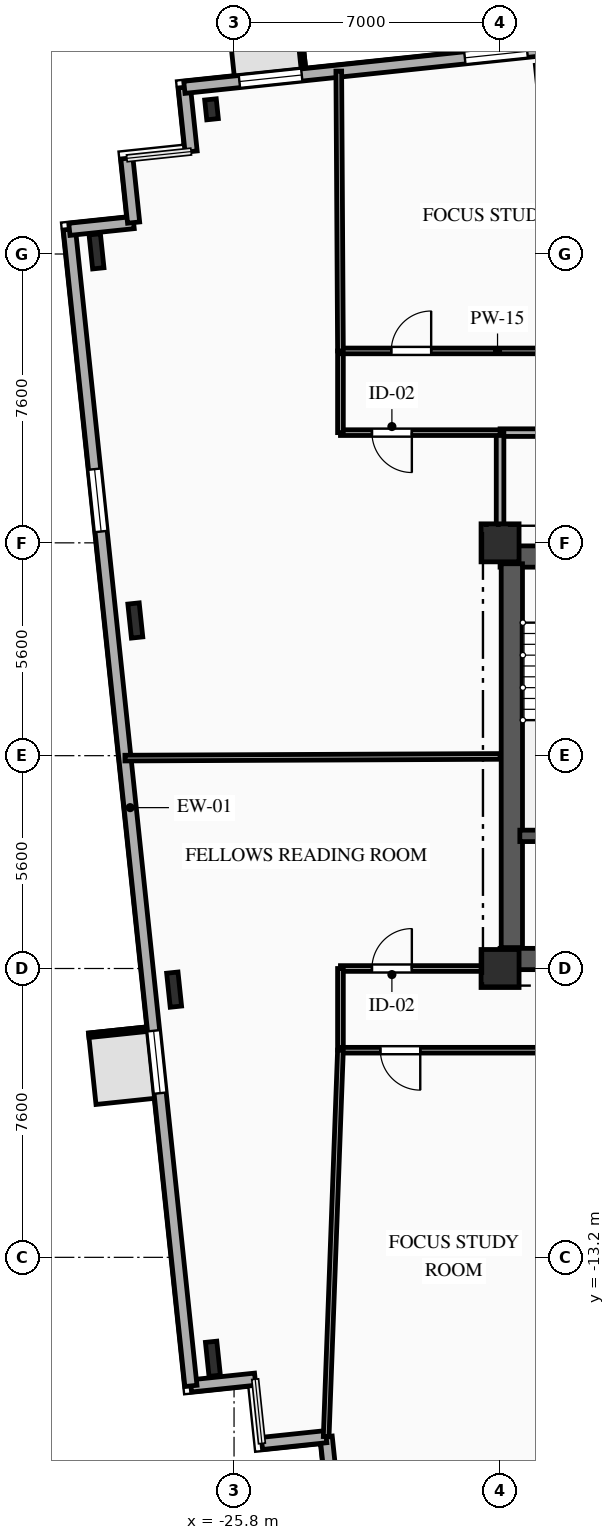
"""IFC4 building model, lengths in metres.
Left out: names, types, materials, properties, quantities, classifications, styles, units other than length and angle.
Written with IfcOpenShell. Run it as: python <this file> out.ifc"""

import sys

from ifc_helpers import new_model, si_unit, direction, frame, frame_2d, origin, origin_2d, place, context, subcontext, project, spatial, rectangle, i_section, extrude, element, fill, save


model = new_model("IFC4")
c1 = context("Model", 3, precision=1e-05, world=origin(), true_north=direction((0.0, 1.0)))
c2 = subcontext(c1, "Body", "Model", "MODEL_VIEW")
j1 = project(units=[si_unit("LENGTHUNIT", "METRE"), si_unit("PLANEANGLEUNIT", "RADIAN")], contexts=[c1])
p1 = place(None, origin())
s1 = spatial("IfcSite", under=j1, at=p1, CompositionType="ELEMENT")
p2 = place(p1, origin())
s2 = spatial("IfcBuilding", under=s1, at=p2, CompositionType="ELEMENT")
p3 = place(p2, frame((0.0, 0.0, 115.85)))
s3 = spatial("IfcBuildingStorey", under=s2, at=p3, CompositionType="ELEMENT", Elevation=115.85)
for number, where, z_axis, x_axis in (
    (1, (-18.8, -5.6, 0.0), (0.0, 0.0, 1.0), (1.0, 0.0, 0.0)),
    (2, (-18.8, 5.6, 0.0), (0.0, 0.0, 1.0), (1.0, 0.0, 0.0)),
):
    element("IfcColumn", number, at=place(p3, frame(where, z_axis=z_axis, x_axis=x_axis)), inside=s3, PredefinedType="COLUMN", context=c2, shape_type="SweptSolid", body=[
        extrude(rectangle(XDim=1.0, YDim=1.0, at=origin_2d()), origin(), (0.0, 0.0, 1.0), 3.35),
    ])
p4 = place(p3, frame((-26.393, 17.007, 0.0), z_axis=(0.0, 0.0, 1.0), x_axis=(0.994521895368, 0.104528463268, 0.0)))
e3 = element("IfcColumn", 3, at=p4, inside=s3, PredefinedType="COLUMN", context=c2, shape_type="SweptSolid", body=[
    extrude(i_section(OverallWidth=0.306, OverallDepth=0.524, WebThickness=0.021, FlangeThickness=0.04, FilletRadius=0.027, at=origin_2d()), origin(), (0.0, 0.0, 1.0), 3.35),
])
for number, where, z_axis, x_axis in (
    (4, (-29.419, 13.271, 0.0), (0.0, 0.0, 1.0), (0.995, 0.105, 0.0)),
    (5, (-28.398, 3.557, 0.0), (0.0, 0.0, 1.0), (0.995, 0.105, 0.0)),
    (6, (-27.377, -6.156, 0.0), (0.0, 0.0, 1.0), (0.995, 0.105, 0.0)),
    (7, (-26.356, -15.869, 0.0), (0.0, 0.0, 1.0), (0.995, 0.105, 0.0)),
):
    element("IfcColumn", number, at=place(p3, frame(where, z_axis=z_axis, x_axis=x_axis)), inside=s3, PredefinedType="COLUMN", context=c2, shape_type="SweptSolid", body=[
        extrude(i_section(OverallWidth=0.3, OverallDepth=0.9, WebThickness=0.019, FlangeThickness=0.035, FilletRadius=0.03, at=origin_2d()), origin(), (0.0, 0.0, 1.0), 3.35),
    ])
for number, where, z_axis, x_axis in (
    (8, (-23.198, -19.609, 0.0), (0.0, 0.0, 1.0), (-0.105, 0.995, 0.0)),
    (9, (-23.376, -17.919, 0.0), (0.0, 0.0, 1.0), (-0.995, -0.105, 0.0)),
):
    element("IfcWall", number, at=place(p3, frame(where, z_axis=z_axis, x_axis=x_axis)), inside=s3, PredefinedType="SOLIDWALL", context=c2, shape_type="SweptSolid", body=[
        extrude(rectangle(XDim=1.7, YDim=0.32, at=frame_2d((0.85, 0.0))), origin(), (0.0, 0.0, 1.0), 3.045),
    ])
p5 = place(p3, frame((-25.244, -16.406, 0.0), z_axis=(0.0, 0.0, 1.0), x_axis=(-0.994521177842, -0.104535289845, 0.0)))
e10 = element("IfcWall", 10, at=p5, inside=s3, PredefinedType="SOLIDWALL", context=c2, shape_type="SweptSolid", body=[
    extrude(rectangle(XDim=1.7, YDim=0.32, at=frame_2d((0.85, 0.0))), origin(), (0.0, 0.0, 1.0), 3.045),
])
p6 = place(p3, frame((-26.935, -16.583, 0.0), z_axis=(0.0, 0.0, 1.0), x_axis=(-0.104524887486, 0.994522271192, 0.0)))
e11 = element("IfcWall", 11, at=p6, inside=s3, PredefinedType="SOLIDWALL", context=c2, shape_type="SweptSolid", body=[
    extrude(rectangle(XDim=30.6, YDim=0.32, at=frame_2d((15.3, 0.0))), origin(), (0.0, 0.0, 1.0), 3.045),
])
p7 = place(p6, frame((7.746, 0.0, 0.85)))
e12 = element("IfcOpeningElement", 12, at=p7, cuts=e11, PredefinedType="OPENING", context=c2, shape_type="SweptSolid", body=[
    extrude(rectangle(XDim=1.65, YDim=1.85, at=frame_2d((0.825, 0.925))), frame((0.0, 0.17, 0.0), z_axis=(0.0, -1.0, 0.0), x_axis=(1.0, 0.0, 0.0)), (0.0, 0.0, 1.0), 0.34),
])
p8 = place(p6, frame((22.606, 0.0, 0.85)))
e13 = element("IfcOpeningElement", 13, at=p8, cuts=e11, PredefinedType="OPENING", context=c2, shape_type="SweptSolid", body=[
    extrude(rectangle(XDim=1.65, YDim=1.85, at=frame_2d((0.825, 0.925))), frame((0.0, 0.17, 0.0), z_axis=(0.0, -1.0, 0.0), x_axis=(1.0, 0.0, 0.0)), (0.0, 0.0, 1.0), 0.34),
])
for number, where, z_axis, x_axis in (
    (14, (-30.133, 13.849, 0.0), (0.0, 0.0, 1.0), (0.995, 0.104, 0.0)),
    (15, (-28.443, 14.027, 0.0), (0.0, 0.0, 1.0), (-0.105, 0.995, 0.0)),
    (16, (-26.93, 15.895, 0.0), (0.0, 0.0, 1.0), (-0.105, 0.995, 0.0)),
):
    element("IfcWall", number, at=place(p3, frame(where, z_axis=z_axis, x_axis=x_axis)), inside=s3, PredefinedType="SOLIDWALL", context=c2, shape_type="SweptSolid", body=[
        extrude(rectangle(XDim=1.7, YDim=0.32, at=frame_2d((0.85, 0.0))), origin(), (0.0, 0.0, 1.0), 3.045),
    ])
p9 = place(p3, frame((-27.107, 17.586, 0.0), z_axis=(0.0, 0.0, 1.0), x_axis=(0.994521628355, 0.104531003701, 0.0)))
e17 = element("IfcWall", 17, at=p9, inside=s3, PredefinedType="SOLIDWALL", context=c2, shape_type="SweptSolid", body=[
    extrude(rectangle(XDim=53.8, YDim=0.32, at=frame_2d((26.9, 0.0))), origin(), (0.0, 0.0, 1.0), 3.045),
])
p10 = place(p9, frame((1.457, 0.0, 0.85)))
e18 = element("IfcOpeningElement", 18, at=p10, cuts=e17, PredefinedType="OPENING", context=c2, shape_type="SweptSolid", body=[
    extrude(rectangle(XDim=1.65, YDim=1.85, at=frame_2d((0.825, 0.925))), frame((0.0, 0.17, 0.0), z_axis=(0.0, -1.0, 0.0), x_axis=(1.0, 0.0, 0.0)), (0.0, 0.0, 1.0), 0.34),
])
p11 = place(p9, frame((7.421, 0.0, 0.85)))
e19 = element("IfcOpeningElement", 19, at=p11, cuts=e17, PredefinedType="OPENING", context=c2, shape_type="SweptSolid", body=[
    extrude(rectangle(XDim=1.65, YDim=1.85, at=frame_2d((0.825, 0.925))), frame((0.0, 0.17, 0.0), z_axis=(0.0, -1.0, 0.0), x_axis=(1.0, 0.0, 0.0)), (0.0, 0.0, 1.0), 0.34),
])
p12 = place(p9, frame((16.743, 0.0, 0.85)))
e20 = element("IfcOpeningElement", 20, at=p12, cuts=e17, PredefinedType="OPENING", context=c2, shape_type="SweptSolid", body=[
    extrude(rectangle(XDim=1.5, YDim=1.85, at=frame_2d((0.75, 0.925))), frame((0.0, 0.17, 0.0), z_axis=(0.0, -1.0, 0.0), x_axis=(1.0, 0.0, 0.0)), (0.0, 0.0, 1.0), 0.34),
])
p13 = place(p9, frame((22.918, 0.0, 0.85)))
e21 = element("IfcOpeningElement", 21, at=p13, cuts=e17, PredefinedType="OPENING", context=c2, shape_type="SweptSolid", body=[
    extrude(rectangle(XDim=2.2, YDim=1.85, at=frame_2d((1.1, 0.925))), frame((0.0, 0.17, 0.0), z_axis=(0.0, -1.0, 0.0), x_axis=(1.0, 0.0, 0.0)), (0.0, 0.0, 1.0), 0.34),
])
p14 = place(p9, frame((30.604, 0.0, 0.85)))
e22 = element("IfcOpeningElement", 22, at=p14, cuts=e17, PredefinedType="OPENING", context=c2, shape_type="SweptSolid", body=[
    extrude(rectangle(XDim=2.2, YDim=1.85, at=frame_2d((1.1, 0.925))), frame((0.0, 0.17, 0.0), z_axis=(0.0, -1.0, 0.0), x_axis=(1.0, 0.0, 0.0)), (0.0, 0.0, 1.0), 0.34),
])
p15 = place(p9, frame((38.289, 0.0, 0.85)))
e23 = element("IfcOpeningElement", 23, at=p15, cuts=e17, PredefinedType="OPENING", context=c2, shape_type="SweptSolid", body=[
    extrude(rectangle(XDim=2.2, YDim=1.85, at=frame_2d((1.1, 0.925))), frame((0.0, 0.17, 0.0), z_axis=(0.0, -1.0, 0.0), x_axis=(1.0, 0.0, 0.0)), (0.0, 0.0, 1.0), 0.34),
])
p16 = place(p9, frame((44.208, 0.0, 0.85)))
e24 = element("IfcOpeningElement", 24, at=p16, cuts=e17, PredefinedType="OPENING", context=c2, shape_type="SweptSolid", body=[
    extrude(rectangle(XDim=1.65, YDim=1.85, at=frame_2d((0.825, 0.925))), frame((0.0, 0.17, 0.0), z_axis=(0.0, -1.0, 0.0), x_axis=(1.0, 0.0, 0.0)), (0.0, 0.0, 1.0), 0.34),
])
p17 = place(p9, frame((47.771, 0.0, 0.85)))
e25 = element("IfcOpeningElement", 25, at=p17, cuts=e17, PredefinedType="OPENING", context=c2, shape_type="SweptSolid", body=[
    extrude(rectangle(XDim=1.65, YDim=1.85, at=frame_2d((0.825, 0.925))), frame((0.0, 0.17, 0.0), z_axis=(0.0, -1.0, 0.0), x_axis=(1.0, 0.0, 0.0)), (0.0, 0.0, 1.0), 0.34),
])
p18 = place(p9, frame((51.129, 0.0, 0.85)))
e26 = element("IfcOpeningElement", 26, at=p18, cuts=e17, PredefinedType="OPENING", context=c2, shape_type="SweptSolid", body=[
    extrude(rectangle(XDim=1.5, YDim=1.85, at=frame_2d((0.75, 0.925))), frame((0.0, 0.17, 0.0), z_axis=(0.0, -1.0, 0.0), x_axis=(1.0, 0.0, 0.0)), (0.0, 0.0, 1.0), 0.34),
])
p19 = place(p3, frame((30.307, -13.986, 0.0), z_axis=(0.0, 0.0, 1.0), x_axis=(-0.994521628355, -0.104531003701, 0.0)))
e27 = element("IfcWall", 27, at=p19, inside=s3, PredefinedType="SOLIDWALL", context=c2, shape_type="SweptSolid", body=[
    extrude(rectangle(XDim=53.8, YDim=0.32, at=frame_2d((26.9, 0.0))), origin(), (0.0, 0.0, 1.0), 3.045),
])
p20 = place(p19, frame((3.098, 0.0, 0.85)))
e28 = element("IfcOpeningElement", 28, at=p20, cuts=e27, PredefinedType="OPENING", context=c2, shape_type="SweptSolid", body=[
    extrude(rectangle(XDim=1.65, YDim=1.85, at=frame_2d((0.825, 0.925))), frame((0.0, 0.17, 0.0), z_axis=(0.0, -1.0, 0.0), x_axis=(1.0, 0.0, 0.0)), (0.0, 0.0, 1.0), 0.34),
])
p21 = place(p19, frame((10.143, 0.0, 0.85)))
e29 = element("IfcOpeningElement", 29, at=p21, cuts=e27, PredefinedType="OPENING", context=c2, shape_type="SweptSolid", body=[
    extrude(rectangle(XDim=1.65, YDim=1.85, at=frame_2d((0.825, 0.925))), frame((0.0, 0.17, 0.0), z_axis=(0.0, -1.0, 0.0), x_axis=(1.0, 0.0, 0.0)), (0.0, 0.0, 1.0), 0.34),
])
p22 = place(p19, frame((16.753, 0.0, 0.85)))
e30 = element("IfcOpeningElement", 30, at=p22, cuts=e27, PredefinedType="OPENING", context=c2, shape_type="SweptSolid", body=[
    extrude(rectangle(XDim=2.2, YDim=1.85, at=frame_2d((1.1, 0.925))), frame((0.0, 0.17, 0.0), z_axis=(0.0, -1.0, 0.0), x_axis=(1.0, 0.0, 0.0)), (0.0, 0.0, 1.0), 0.34),
])
p23 = place(p19, frame((23.358, 0.0, 0.85)))
e31 = element("IfcOpeningElement", 31, at=p23, cuts=e27, PredefinedType="OPENING", context=c2, shape_type="SweptSolid", body=[
    extrude(rectangle(XDim=2.2, YDim=1.85, at=frame_2d((1.1, 0.925))), frame((0.0, 0.17, 0.0), z_axis=(0.0, -1.0, 0.0), x_axis=(1.0, 0.0, 0.0)), (0.0, 0.0, 1.0), 0.34),
])
p24 = place(p19, frame((29.963, 0.0, 0.85)))
e32 = element("IfcOpeningElement", 32, at=p24, cuts=e27, PredefinedType="OPENING", context=c2, shape_type="SweptSolid", body=[
    extrude(rectangle(XDim=2.2, YDim=1.85, at=frame_2d((1.1, 0.925))), frame((0.0, 0.17, 0.0), z_axis=(0.0, -1.0, 0.0), x_axis=(1.0, 0.0, 0.0)), (0.0, 0.0, 1.0), 0.34),
])
p25 = place(p19, frame((36.568, 0.0, 0.85)))
e33 = element("IfcOpeningElement", 33, at=p25, cuts=e27, PredefinedType="OPENING", context=c2, shape_type="SweptSolid", body=[
    extrude(rectangle(XDim=2.2, YDim=1.85, at=frame_2d((1.1, 0.925))), frame((0.0, 0.17, 0.0), z_axis=(0.0, -1.0, 0.0), x_axis=(1.0, 0.0, 0.0)), (0.0, 0.0, 1.0), 0.34),
])
p26 = place(p19, frame((43.173, 0.0, 0.85)))
e34 = element("IfcOpeningElement", 34, at=p26, cuts=e27, PredefinedType="OPENING", context=c2, shape_type="SweptSolid", body=[
    extrude(rectangle(XDim=2.2, YDim=1.85, at=frame_2d((1.1, 0.925))), frame((0.0, 0.17, 0.0), z_axis=(0.0, -1.0, 0.0), x_axis=(1.0, 0.0, 0.0)), (0.0, 0.0, 1.0), 0.34),
])
p27 = place(p19, frame((49.653, 0.0, 0.85)))
e35 = element("IfcOpeningElement", 35, at=p27, cuts=e27, PredefinedType="OPENING", context=c2, shape_type="SweptSolid", body=[
    extrude(rectangle(XDim=1.65, YDim=1.85, at=frame_2d((0.825, 0.925))), frame((0.0, 0.17, 0.0), z_axis=(0.0, -1.0, 0.0), x_axis=(1.0, 0.0, 0.0)), (0.0, 0.0, 1.0), 0.34),
])
p28 = place(p3, frame((-18.8, 5.24, 0.0), z_axis=(0.0, 0.0, 1.0), x_axis=(1.0, 0.0, 0.0)))
e36 = element("IfcWall", 36, at=p28, inside=s3, PredefinedType="SHEAR", context=c2, shape_type="SweptSolid", body=[
    extrude(rectangle(XDim=9.6, YDim=0.56, at=frame_2d((4.8, 0.0))), origin(), (0.0, 0.0, 1.0), 3.045),
])
p29 = place(p28, frame((1.55, 0.0, 0.0)))
e37 = element("IfcOpeningElement", 37, at=p29, cuts=e36, PredefinedType="OPENING", context=c2, shape_type="SweptSolid", body=[
    extrude(rectangle(XDim=1.1, YDim=2.15, at=frame_2d((0.55, 1.075))), frame((0.0, 0.29, 0.0), z_axis=(0.0, -1.0, 0.0), x_axis=(1.0, 0.0, 0.0)), (0.0, 0.0, 1.0), 0.58),
])
p30 = place(p28, frame((4.775, 0.0, 0.0)))
e38 = element("IfcOpeningElement", 38, at=p30, cuts=e36, PredefinedType="OPENING", context=c2, shape_type="SweptSolid", body=[
    extrude(rectangle(XDim=1.05, YDim=2.1, at=frame_2d((0.525, 1.05))), frame((0.0, 0.29, 0.0), z_axis=(0.0, -1.0, 0.0), x_axis=(1.0, 0.0, 0.0)), (0.0, 0.0, 1.0), 0.58),
])
p31 = place(p3, frame((-18.8, -5.35, 0.0), z_axis=(0.0, 0.0, 1.0), x_axis=(1.0, 0.0, 0.0)))
e39 = element("IfcWall", 39, at=p31, inside=s3, PredefinedType="SHEAR", context=c2, shape_type="SweptSolid", body=[
    extrude(rectangle(XDim=9.6, YDim=0.56, at=frame_2d((4.8, 0.0))), origin(), (0.0, 0.0, 1.0), 3.045),
])
p32 = place(p31, frame((1.05, 0.0, 0.0)))
e40 = element("IfcOpeningElement", 40, at=p32, cuts=e39, PredefinedType="OPENING", context=c2, shape_type="SweptSolid", body=[
    extrude(rectangle(XDim=0.9, YDim=2.1, at=frame_2d((0.45, 1.05))), frame((0.0, 0.29, 0.0), z_axis=(0.0, -1.0, 0.0), x_axis=(1.0, 0.0, 0.0)), (0.0, 0.0, 1.0), 0.58),
])
p33 = place(p3, frame((-18.49, -5.05, 0.0), z_axis=(0.0, 0.0, 1.0), x_axis=(0.0, 1.0, 0.0)))
e41 = element("IfcWall", 41, at=p33, inside=s3, PredefinedType="SHEAR", context=c2, shape_type="SweptSolid", body=[
    extrude(rectangle(XDim=10.1, YDim=0.56, at=frame_2d((5.05, 0.0))), origin(), (0.0, 0.0, 1.0), 3.045),
])
p34 = place(p3, frame((-18.28, -2.11, 0.0), z_axis=(0.0, 0.0, 1.0), x_axis=(1.0, 0.0, 0.0)))
e42 = element("IfcWall", 42, at=p34, inside=s3, PredefinedType="SHEAR", context=c2, shape_type="SweptSolid", body=[
    extrude(rectangle(XDim=3.18, YDim=0.3, at=frame_2d((1.59, 0.0))), origin(), (0.0, 0.0, 1.0), 3.045),
])
p35 = place(p3, frame((-12.0, 8.5, 0.0), z_axis=(0.0, 0.0, 1.0), x_axis=(-1.0, 0.0, 0.0)))
e43 = element("IfcWall", 43, at=p35, inside=s3, PredefinedType="PARTITIONING", context=c2, shape_type="SweptSolid", body=[
    extrude(rectangle(XDim=6.8, YDim=0.2, at=frame_2d((3.4, 0.0))), origin(), (0.0, 0.0, 1.0), 3.045),
])
p36 = place(p35, frame((1.715, 0.0, 0.0)))
e44 = element("IfcOpeningElement", 44, at=p36, cuts=e43, PredefinedType="OPENING", context=c2, shape_type="SweptSolid", body=[
    extrude(rectangle(XDim=1.1, YDim=2.15, at=frame_2d((0.55, 1.075))), frame((0.0, 0.11, 0.0), z_axis=(0.0, -1.0, 0.0), x_axis=(1.0, 0.0, 0.0)), (0.0, 0.0, 1.0), 0.22),
])
p37 = place(p3, frame((-18.8, 8.5, 0.0), z_axis=(0.0, 0.0, 1.0), x_axis=(0.0, -1.0, 0.0)))
e45 = element("IfcWall", 45, at=p37, inside=s3, PredefinedType="PARTITIONING", context=c2, shape_type="SweptSolid", body=[
    extrude(rectangle(XDim=2.9, YDim=0.2, at=frame_2d((1.45, 0.0))), origin(), (0.0, 0.0, 1.0), 2.53),
])
p38 = place(p3, frame((-18.8, 8.5, 0.0), z_axis=(0.0, 0.0, 1.0), x_axis=(-1.0, 0.0, 0.0)))
e46 = element("IfcWall", 46, at=p38, inside=s3, PredefinedType="PARTITIONING", context=c2, shape_type="SweptSolid", body=[
    extrude(rectangle(XDim=4.2, YDim=0.15, at=frame_2d((2.1, 0.0))), origin(), (0.0, 0.0, 1.0), 3.045),
])
p39 = place(p38, frame((2.321, 0.0, 0.0)))
e47 = element("IfcOpeningElement", 47, at=p39, cuts=e46, PredefinedType="OPENING", context=c2, shape_type="SweptSolid", body=[
    extrude(rectangle(XDim=1.05, YDim=2.15, at=frame_2d((0.525, 1.075))), frame((0.0, 0.085, 0.0), z_axis=(0.0, -1.0, 0.0), x_axis=(1.0, 0.0, 0.0)), (0.0, 0.0, 1.0), 0.17),
])
p40 = place(p3, frame((-23.0, 8.5, 0.0), z_axis=(0.0, 0.0, 1.0), x_axis=(0.0, 1.0, 0.0)))
e48 = element("IfcWall", 48, at=p40, inside=s3, PredefinedType="PARTITIONING", context=c2, shape_type="SweptSolid", body=[
    extrude(rectangle(XDim=2.15, YDim=0.15, at=frame_2d((1.075, 0.0))), origin(), (0.0, 0.0, 1.0), 3.045),
])
p41 = place(p3, frame((-23.0, 10.65, 0.0), z_axis=(0.0, 0.0, 1.0), x_axis=(1.0, 0.0, 0.0)))
e49 = element("IfcWall", 49, at=p41, inside=s3, PredefinedType="PARTITIONING", context=c2, shape_type="SweptSolid", body=[
    extrude(rectangle(XDim=8.267, YDim=0.15, at=frame_2d((4.134, 0.0))), origin(), (0.0, 0.0, 1.0), 3.045),
])
p42 = place(p41, frame((1.337, 0.0, 0.0)))
e50 = element("IfcOpeningElement", 50, at=p42, cuts=e49, PredefinedType="OPENING", context=c2, shape_type="SweptSolid", body=[
    extrude(rectangle(XDim=1.05, YDim=2.15, at=frame_2d((0.525, 1.075))), frame((0.0, 0.085, 0.0), z_axis=(0.0, -1.0, 0.0), x_axis=(1.0, 0.0, 0.0)), (0.0, 0.0, 1.0), 0.17),
])
p43 = place(p3, frame((-23.0, -5.6, 0.0), z_axis=(0.0, 0.0, 1.0), x_axis=(1.0, 0.0, 0.0)))
e51 = element("IfcWall", 51, at=p43, inside=s3, PredefinedType="PARTITIONING", context=c2, shape_type="SweptSolid", body=[
    extrude(rectangle(XDim=4.2, YDim=0.15, at=frame_2d((2.1, 0.0))), origin(), (0.0, 0.0, 1.0), 3.045),
])
p44 = place(p43, frame((0.829, 0.0, 0.0)))
e52 = element("IfcOpeningElement", 52, at=p44, cuts=e51, PredefinedType="OPENING", context=c2, shape_type="SweptSolid", body=[
    extrude(rectangle(XDim=1.05, YDim=2.15, at=frame_2d((0.525, 1.075))), frame((0.0, 0.085, 0.0), z_axis=(0.0, -1.0, 0.0), x_axis=(1.0, 0.0, 0.0)), (0.0, 0.0, 1.0), 0.17),
])
p45 = place(p3, frame((-23.0, -7.75, 0.0), z_axis=(0.0, 0.0, 1.0), x_axis=(0.0, 1.0, 0.0)))
e53 = element("IfcWall", 53, at=p45, inside=s3, PredefinedType="PARTITIONING", context=c2, shape_type="SweptSolid", body=[
    extrude(rectangle(XDim=2.15, YDim=0.15, at=frame_2d((1.075, 0.0))), origin(), (0.0, 0.0, 1.0), 2.7),
])
p46 = place(p3, frame((-17.029, -7.75, 0.0), z_axis=(0.0, 0.0, 1.0), x_axis=(-1.0, 0.0, 0.0)))
e54 = element("IfcWall", 54, at=p46, inside=s3, PredefinedType="PARTITIONING", context=c2, shape_type="SweptSolid", body=[
    extrude(rectangle(XDim=5.971, YDim=0.15, at=frame_2d((2.985, 0.0))), origin(), (0.0, 0.0, 1.0), 3.045),
])
p47 = place(p46, frame((3.871, 0.0, 0.0)))
e55 = element("IfcOpeningElement", 55, at=p47, cuts=e54, PredefinedType="OPENING", context=c2, shape_type="SweptSolid", body=[
    extrude(rectangle(XDim=1.05, YDim=2.15, at=frame_2d((0.525, 1.075))), frame((0.0, 0.085, 0.0), z_axis=(0.0, -1.0, 0.0), x_axis=(1.0, 0.0, 0.0)), (0.0, 0.0, 1.0), 0.17),
])
p48 = place(p3, frame((-28.671, -0.064, 0.0), z_axis=(0.0, 0.0, 1.0), x_axis=(0.999990089865, 0.004451985263, 0.0)))
e56 = element("IfcWall", 56, at=p48, inside=s3, PredefinedType="PARTITIONING", context=c2, shape_type="SweptSolid", body=[
    extrude(rectangle(XDim=9.871, YDim=0.15, at=frame_2d((4.936, 0.0))), origin(), (0.0, 0.0, 1.0), 3.045),
])
p49 = place(p3, frame((-23.0, -7.75, 0.0), z_axis=(0.0, 0.0, 1.0), x_axis=(-0.036924695214, -0.999318050914, 0.0)))
e57 = element("IfcWall", 57, at=p49, inside=s3, PredefinedType="PARTITIONING", context=c2, shape_type="SweptSolid", body=[
    extrude(rectangle(XDim=10.176, YDim=0.15, at=frame_2d((5.088, 0.0))), origin(), (0.0, 0.0, 1.0), 3.045),
])
p50 = place(p3, frame((-23.044, 18.013, 0.0), z_axis=(0.0, 0.0, 1.0), x_axis=(0.005968459246, -0.999982188588, 0.0)))
e58 = element("IfcWall", 58, at=p50, inside=s3, PredefinedType="PARTITIONING", context=c2, shape_type="SweptSolid", body=[
    extrude(rectangle(XDim=7.363, YDim=0.15, at=frame_2d((3.682, 0.0))), origin(), (0.0, 0.0, 1.0), 3.045),
])
p51 = place(p7, origin())
e59 = element("IfcWindow", 59, at=p51, inside=s3, PartitioningType="SINGLE_PANEL", PredefinedType="WINDOW", context=c2, shape_type="SweptSolid", body=[
    extrude(rectangle(XDim=1.65, YDim=1.85, at=frame_2d((0.825, 0.925))), frame((0.0, 0.03, 0.0), z_axis=(0.0, -1.0, 0.0), x_axis=(1.0, 0.0, 0.0)), (0.0, 0.0, 1.0), 0.06),
])
fill(e12, e59)
p52 = place(p8, origin())
e60 = element("IfcWindow", 60, at=p52, inside=s3, PartitioningType="SINGLE_PANEL", PredefinedType="WINDOW", context=c2, shape_type="SweptSolid", body=[
    extrude(rectangle(XDim=1.65, YDim=1.85, at=frame_2d((0.825, 0.925))), frame((0.0, 0.03, 0.0), z_axis=(0.0, -1.0, 0.0), x_axis=(1.0, 0.0, 0.0)), (0.0, 0.0, 1.0), 0.06),
])
fill(e13, e60)
p53 = place(p10, origin())
e61 = element("IfcWindow", 61, at=p53, inside=s3, PartitioningType="SINGLE_PANEL", PredefinedType="WINDOW", context=c2, shape_type="SweptSolid", body=[
    extrude(rectangle(XDim=1.65, YDim=1.85, at=frame_2d((0.825, 0.925))), frame((0.0, 0.03, 0.0), z_axis=(0.0, -1.0, 0.0), x_axis=(1.0, 0.0, 0.0)), (0.0, 0.0, 1.0), 0.06),
])
fill(e18, e61)
p54 = place(p11, origin())
e62 = element("IfcWindow", 62, at=p54, inside=s3, PartitioningType="SINGLE_PANEL", PredefinedType="WINDOW", context=c2, shape_type="SweptSolid", body=[
    extrude(rectangle(XDim=1.65, YDim=1.85, at=frame_2d((0.825, 0.925))), frame((0.0, 0.03, 0.0), z_axis=(0.0, -1.0, 0.0), x_axis=(1.0, 0.0, 0.0)), (0.0, 0.0, 1.0), 0.06),
])
fill(e19, e62)
p55 = place(p39, origin())
e63 = element("IfcDoor", 63, at=p55, inside=s3, OperationType="SINGLE_SWING_LEFT", PredefinedType="DOOR", context=c2, shape_type="SweptSolid", body=[
    extrude(rectangle(XDim=1.05, YDim=2.15, at=frame_2d((0.525, 1.075))), frame((0.0, 0.025, 0.0), z_axis=(0.0, -1.0, 0.0), x_axis=(1.0, 0.0, 0.0)), (0.0, 0.0, 1.0), 0.05),
])
fill(e47, e63)
p56 = place(p42, origin())
e64 = element("IfcDoor", 64, at=p56, inside=s3, OperationType="SINGLE_SWING_RIGHT", PredefinedType="DOOR", context=c2, shape_type="SweptSolid", body=[
    extrude(rectangle(XDim=1.05, YDim=2.15, at=frame_2d((0.525, 1.075))), frame((0.0, 0.025, 0.0), z_axis=(0.0, -1.0, 0.0), x_axis=(1.0, 0.0, 0.0)), (0.0, 0.0, 1.0), 0.05),
])
fill(e50, e64)
p57 = place(p44, origin())
e65 = element("IfcDoor", 65, at=p57, inside=s3, OperationType="SINGLE_SWING_RIGHT", PredefinedType="DOOR", context=c2, shape_type="SweptSolid", body=[
    extrude(rectangle(XDim=1.05, YDim=2.15, at=frame_2d((0.525, 1.075))), frame((0.0, 0.025, 0.0), z_axis=(0.0, -1.0, 0.0), x_axis=(1.0, 0.0, 0.0)), (0.0, 0.0, 1.0), 0.05),
])
fill(e52, e65)
p58 = place(p47, origin())
e66 = element("IfcDoor", 66, at=p58, inside=s3, OperationType="SINGLE_SWING_LEFT", PredefinedType="DOOR", context=c2, shape_type="SweptSolid", body=[
    extrude(rectangle(XDim=1.05, YDim=2.15, at=frame_2d((0.525, 1.075))), frame((0.0, 0.025, 0.0), z_axis=(0.0, -1.0, 0.0), x_axis=(1.0, 0.0, 0.0)), (0.0, 0.0, 1.0), 0.05),
])
fill(e55, e66)
save(model, sys.argv[1])
